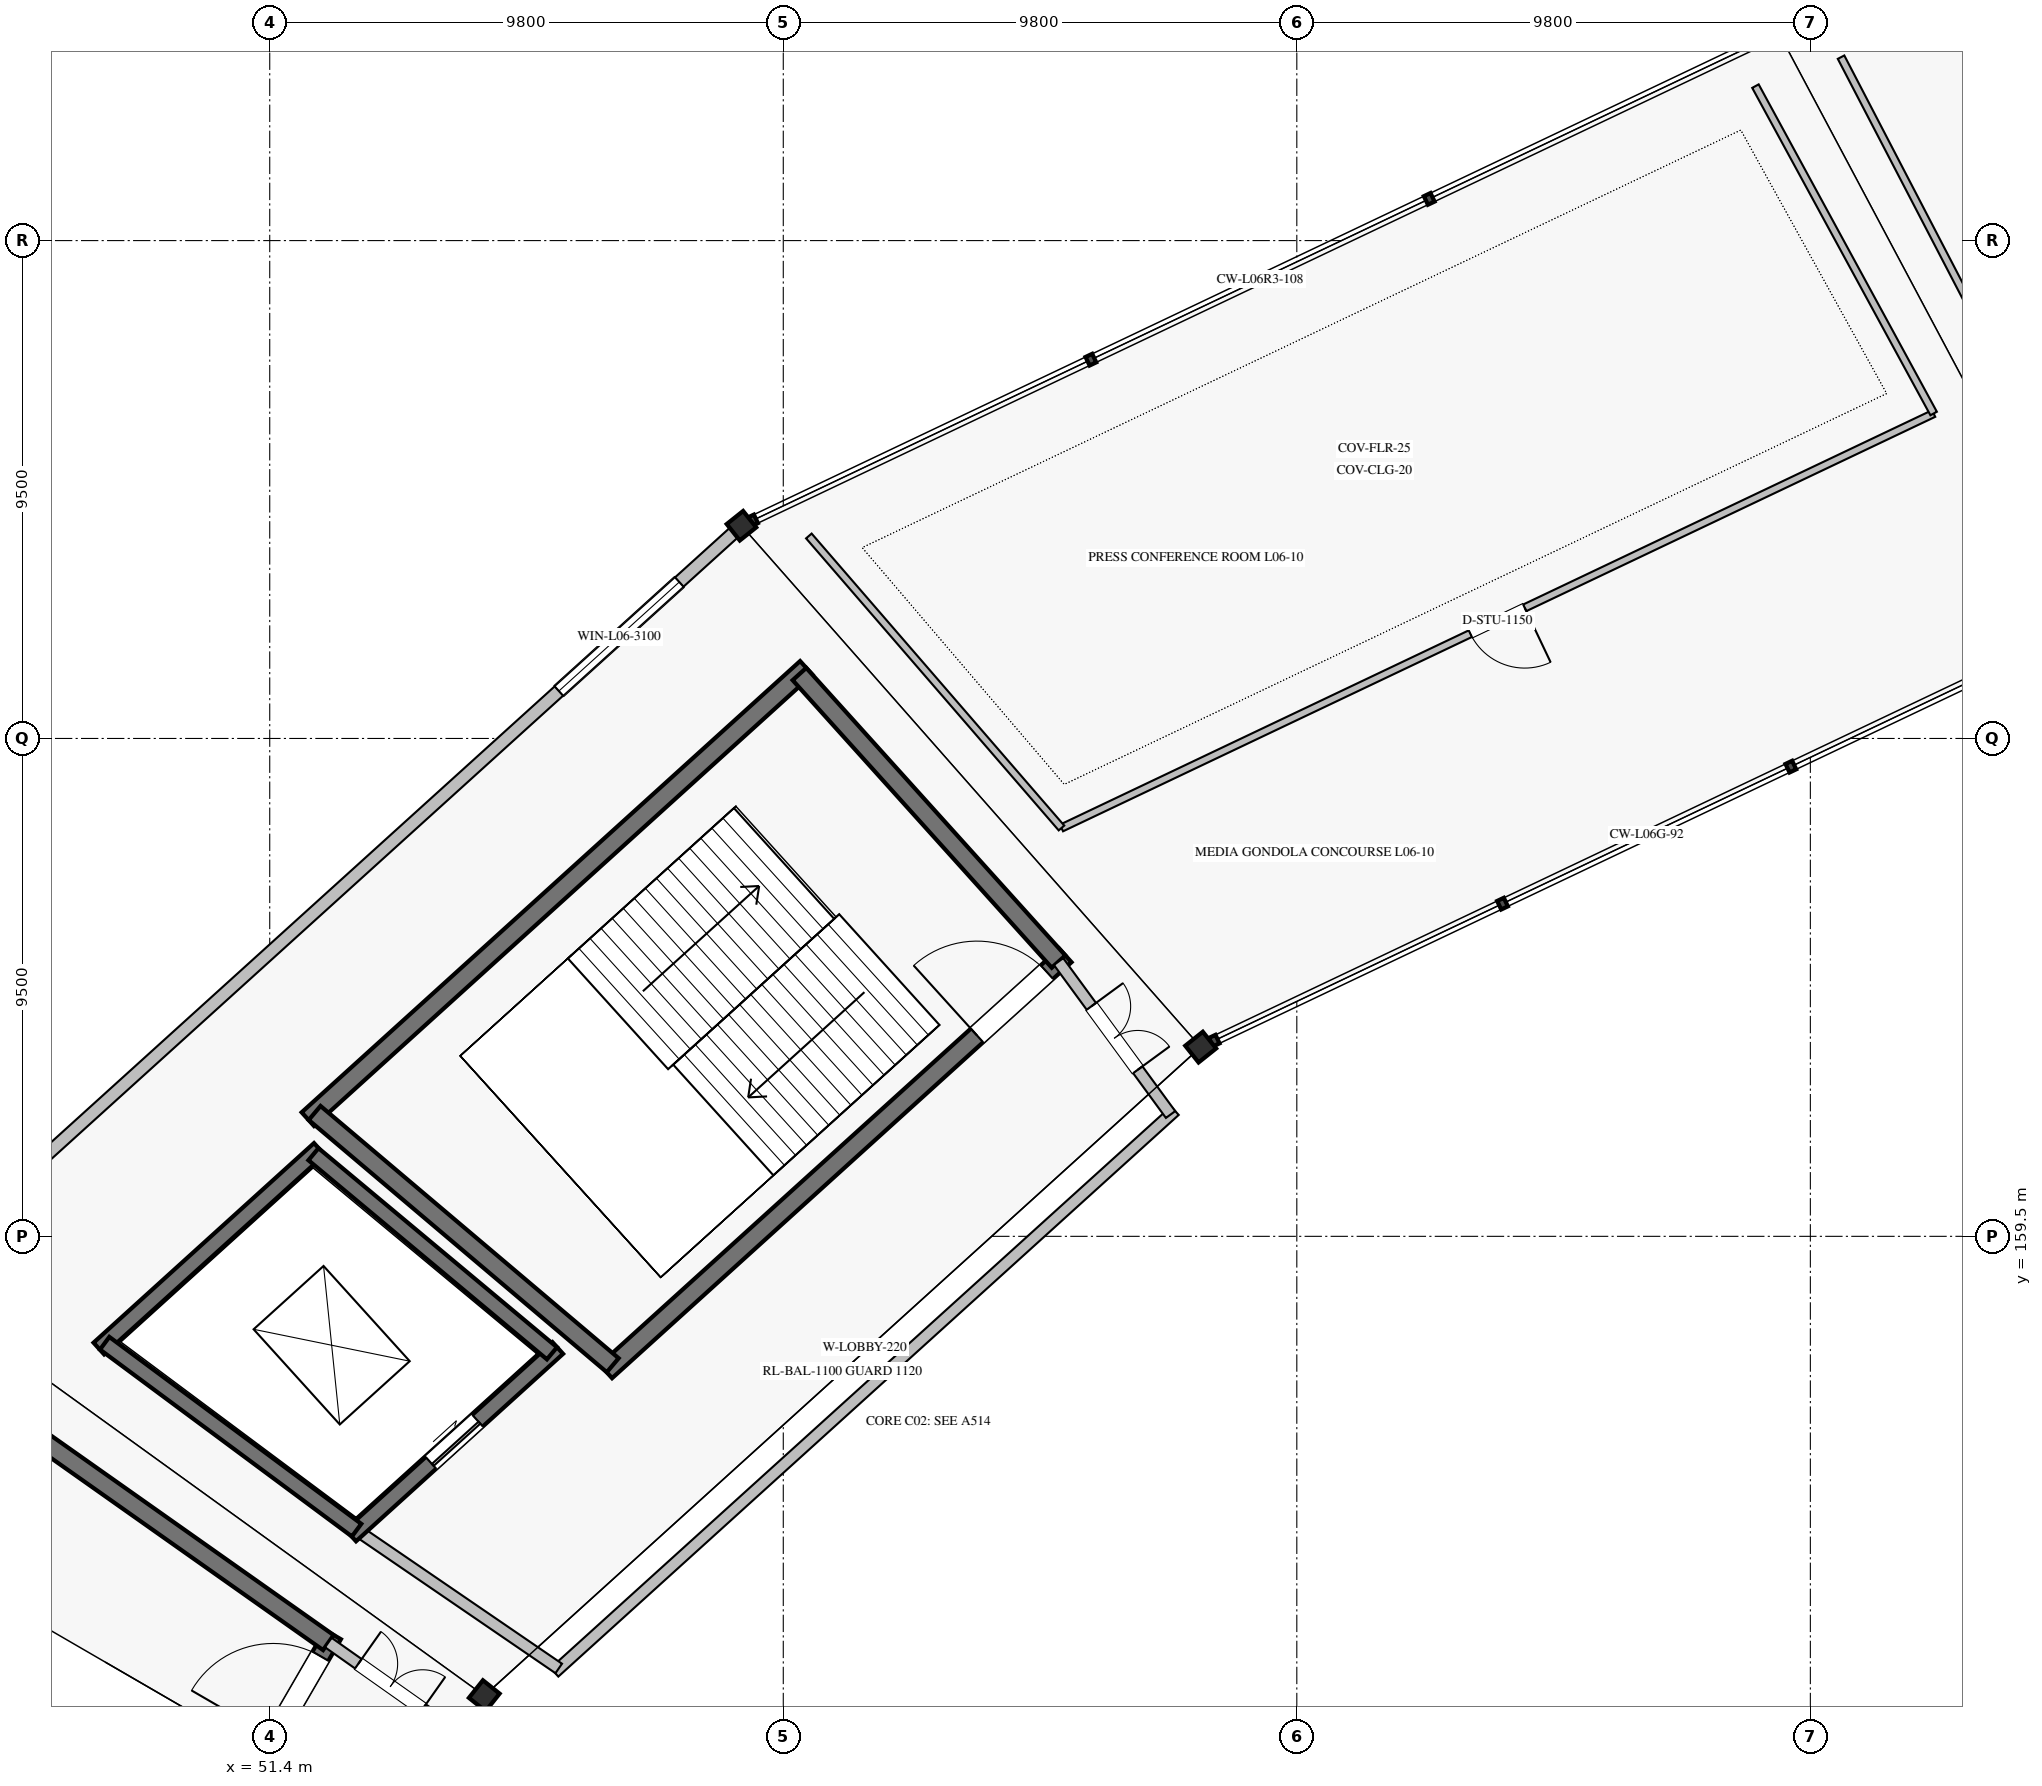
"""IFC4 building model, lengths in metres.
Left out: names, types, materials, properties, quantities, classifications, styles, units other than length and angle.
Written with IfcOpenShell. Run it as: python <this file> out.ifc"""

import sys

from ifc_helpers import new_model, si_unit, direction, frame, frame_2d, origin, origin_2d, place, context, subcontext, project, spatial, rectangle, hollow_rectangle, i_section, extrude, element, fill, save


model = new_model("IFC4")
c1 = context("Model", 3, precision=1e-05, world=origin(), true_north=direction((0.0, 1.0)))
c2 = subcontext(c1, "Body", "Model", "MODEL_VIEW")
j1 = project(units=[si_unit("LENGTHUNIT", "METRE"), si_unit("PLANEANGLEUNIT", "RADIAN")], contexts=[c1])
p1 = place(None, origin())
s1 = spatial("IfcSite", under=j1, at=p1, CompositionType="ELEMENT")
p2 = place(p1, origin())
s2 = spatial("IfcBuilding", under=s1, at=p2, CompositionType="ELEMENT")
p3 = place(p2, frame((0.0, 0.0, 31.28)))
s3 = spatial("IfcBuildingStorey", under=s2, at=p3, CompositionType="ELEMENT", Elevation=31.28)
for number, where, z_axis, x_axis in (
    (1, (69.166, 163.111, 0.0), (0.0, 0.0, 1.0), (-0.623, 0.782, 0.0)),
    (2, (55.494, 150.734, 0.0), (0.0, 0.0, 1.0), (-0.782, 0.623, 0.0)),
):
    element("IfcColumn", number, at=place(p3, frame(where, z_axis=z_axis, x_axis=x_axis)), inside=s3, PredefinedType="COLUMN", context=c2, shape_type="SweptSolid", body=[
        extrude(i_section(OverallWidth=0.407, OverallDepth=0.428, WebThickness=0.02, FlangeThickness=0.035, FilletRadius=0.013, at=origin_2d()), origin(), (0.0, 0.0, 1.0), 5.44),
    ])
p4 = place(p3, frame((60.402, 173.059, 0.0), z_axis=(0.0, 0.0, 1.0), x_axis=(-0.623489801853, 0.781831482473, 0.0)))
e3 = element("IfcColumn", 3, at=p4, inside=s3, PredefinedType="COLUMN", context=c2, shape_type="SweptSolid", body=[
    extrude(hollow_rectangle(XDim=0.4, YDim=0.4, WallThickness=0.019, at=origin_2d()), origin(), (0.0, 0.0, 1.0), 5.44),
])
p5 = place(p3, frame((60.254, 172.925, 0.0), z_axis=(0.0, 0.0, 1.0), x_axis=(-0.74134637924, -0.671122601309, 0.0)))
e4 = element("IfcWall", 4, at=p5, inside=s3, PredefinedType="SOLIDWALL", context=c2, shape_type="SweptSolid", body=[
    extrude(rectangle(XDim=21.044, YDim=0.24, at=frame_2d((10.522, 0.0))), origin(), (0.0, 0.0, 1.0), 4.358),
])
p6 = place(p5, frame((1.4, 0.0, 1.0)))
e5 = element("IfcOpeningElement", 5, at=p6, cuts=e4, PredefinedType="OPENING", context=c2, shape_type="SweptSolid", body=[
    extrude(rectangle(XDim=3.1, YDim=2.15, at=frame_2d((1.55, 1.075))), frame((0.0, 0.13, 0.0), z_axis=(0.0, -1.0, 0.0), x_axis=(1.0, 0.0, 0.0)), (0.0, 0.0, 1.0), 0.26),
])
p7 = place(p3, frame((66.583, 164.86, 0.0), z_axis=(0.0, 0.0, 1.0), x_axis=(-0.741348929385, -0.671119784315, 0.0)))
e6 = element("IfcWall", 6, at=p7, inside=s3, PredefinedType="SHEAR", context=c2, shape_type="SweptSolid", body=[
    extrude(rectangle(XDim=11.826, YDim=0.35, at=frame_2d((5.913, 0.0))), origin(), (0.0, 0.0, 1.0), 5.16),
])
p8 = place(p7, frame((0.475, 0.0, 0.0)))
e7 = element("IfcOpeningElement", 7, at=p8, cuts=e6, PredefinedType="OPENING", context=c2, shape_type="SweptSolid", body=[
    extrude(rectangle(XDim=1.8, YDim=2.2, at=frame_2d((0.9, 1.1))), frame((0.0, 0.185, 0.0), z_axis=(0.0, -1.0, 0.0), x_axis=(1.0, 0.0, 0.0)), (0.0, 0.0, 1.0), 0.37),
])
p9 = place(p3, frame((61.639, 170.347, 0.0), z_axis=(0.0, 0.0, 1.0), x_axis=(-0.741351373721, -0.671117084183, 0.0)))
e8 = element("IfcWall", 8, at=p9, inside=s3, PredefinedType="SHEAR", context=c2, shape_type="SweptSolid", body=[
    extrude(rectangle(XDim=12.83, YDim=0.35, at=frame_2d((6.415, 0.0))), origin(), (0.0, 0.0, 1.0), 5.16),
])
p10 = place(p3, frame((66.454, 164.743, 0.0), z_axis=(0.0, 0.0, 1.0), x_axis=(-0.669463145673, 0.742845270958, 0.0)))
e9 = element("IfcWall", 9, at=p10, inside=s3, PredefinedType="SHEAR", context=c2, shape_type="SweptSolid", body=[
    extrude(rectangle(XDim=7.386, YDim=0.35, at=frame_2d((3.693, 0.0))), origin(), (0.0, 0.0, 1.0), 5.16),
])
p11 = place(p3, frame((57.945, 157.041, 0.0), z_axis=(0.0, 0.0, 1.0), x_axis=(-0.763422324031, 0.64589964791, 0.0)))
e10 = element("IfcWall", 10, at=p11, inside=s3, PredefinedType="SHEAR", context=c2, shape_type="SweptSolid", body=[
    extrude(rectangle(XDim=7.452, YDim=0.35, at=frame_2d((3.726, 0.0))), origin(), (0.0, 0.0, 1.0), 5.16),
])
p12 = place(p3, frame((56.897, 157.369, 0.0), z_axis=(0.0, 0.0, 1.0), x_axis=(-0.741350155641, -0.671118429736, 0.0)))
e11 = element("IfcWall", 11, at=p12, inside=s3, PredefinedType="SHEAR", context=c2, shape_type="SweptSolid", body=[
    extrude(rectangle(XDim=5.329, YDim=0.3, at=frame_2d((2.665, 0.0))), origin(), (0.0, 0.0, 1.0), 5.16),
])
p13 = place(p12, frame((2.065, 0.0, 0.0)))
e12 = element("IfcOpeningElement", 12, at=p13, cuts=e11, PredefinedType="OPENING", context=c2, shape_type="SweptSolid", body=[
    extrude(rectangle(XDim=1.2, YDim=2.2, at=frame_2d((0.6, 1.1))), frame((0.0, 0.16, 0.0), z_axis=(0.0, -1.0, 0.0), x_axis=(1.0, 0.0, 0.0)), (0.0, 0.0, 1.0), 0.32),
])
p14 = place(p3, frame((52.346, 161.168, 0.0), z_axis=(0.0, 0.0, 1.0), x_axis=(-0.74134208775, -0.671127341815, 0.0)))
e13 = element("IfcWall", 13, at=p14, inside=s3, PredefinedType="SHEAR", context=c2, shape_type="SweptSolid", body=[
    extrude(rectangle(XDim=5.675, YDim=0.3, at=frame_2d((2.837, 0.0))), origin(), (0.0, 0.0, 1.0), 5.16),
])
p15 = place(p3, frame((56.786, 157.268, 0.0), z_axis=(0.0, 0.0, 1.0), x_axis=(-0.767711354146, 0.640795815151, 0.0)))
e14 = element("IfcWall", 14, at=p15, inside=s3, PredefinedType="SHEAR", context=c2, shape_type="SweptSolid", body=[
    extrude(rectangle(XDim=5.929, YDim=0.3, at=frame_2d((2.964, 0.0))), origin(), (0.0, 0.0, 1.0), 5.16),
])
p16 = place(p3, frame((53.058, 153.893, 0.0), z_axis=(0.0, 0.0, 1.0), x_axis=(-0.803101805449, 0.59584183311, 0.0)))
e15 = element("IfcWall", 15, at=p16, inside=s3, PredefinedType="SHEAR", context=c2, shape_type="SweptSolid", body=[
    extrude(rectangle(XDim=5.986, YDim=0.3, at=frame_2d((2.993, 0.0))), origin(), (0.0, 0.0, 1.0), 5.16),
])
p17 = place(p3, frame((68.673, 161.898, 0.0), z_axis=(0.0, 0.0, 1.0), x_axis=(-0.741351035574, -0.671117457717, 0.0)))
e16 = element("IfcWall", 16, at=p17, inside=s3, PredefinedType="SOLIDWALL", context=c2, shape_type="SweptSolid", body=[
    extrude(rectangle(XDim=15.969, YDim=0.22, at=frame_2d((7.985, 0.0))), origin(), (0.0, 0.0, 1.0), 5.16),
])
p18 = place(p3, frame((68.591, 161.824, 0.0), z_axis=(0.0, 0.0, 1.0), x_axis=(-0.590836915359, 0.806791013491, 0.0)))
e17 = element("IfcWall", 17, at=p18, inside=s3, PredefinedType="SOLIDWALL", context=c2, shape_type="SweptSolid", body=[
    extrude(rectangle(XDim=3.618, YDim=0.22, at=frame_2d((1.809, 0.0))), origin(), (0.0, 0.0, 1.0), 5.16),
])
p19 = place(p18, frame((1.059, 0.0, 0.0)))
e18 = element("IfcOpeningElement", 18, at=p19, cuts=e17, PredefinedType="OPENING", context=c2, shape_type="SweptSolid", body=[
    extrude(rectangle(XDim=1.5, YDim=2.2, at=frame_2d((0.75, 1.1))), frame((0.0, 0.12, 0.0), z_axis=(0.0, -1.0, 0.0), x_axis=(1.0, 0.0, 0.0)), (0.0, 0.0, 1.0), 0.24),
])
p20 = place(p3, frame((56.915, 151.254, 0.0), z_axis=(0.0, 0.0, 1.0), x_axis=(-0.825385410642, 0.564569680287, 0.0)))
e19 = element("IfcWall", 19, at=p20, inside=s3, PredefinedType="SOLIDWALL", context=c2, shape_type="SweptSolid", body=[
    extrude(rectangle(XDim=4.674, YDim=0.22, at=frame_2d((2.337, 0.0))), origin(), (0.0, 0.0, 1.0), 5.16),
])
p21 = place(p3, frame((52.606, 151.9, 0.0), z_axis=(0.0, 0.0, 1.0), x_axis=(-0.501587404838, -0.865106973332, 0.0)))
e20 = element("IfcWall", 20, at=p21, inside=s3, PredefinedType="SHEAR", context=c2, shape_type="SweptSolid", body=[
    extrude(rectangle(XDim=11.435, YDim=0.35, at=frame_2d((5.718, 0.0))), origin(), (0.0, 0.0, 1.0), 5.16),
])
p22 = place(p21, frame((0.475, 0.0, 0.0)))
e21 = element("IfcOpeningElement", 21, at=p22, cuts=e20, PredefinedType="OPENING", context=c2, shape_type="SweptSolid", body=[
    extrude(rectangle(XDim=1.8, YDim=2.2, at=frame_2d((0.9, 1.1))), frame((0.0, 0.185, 0.0), z_axis=(0.0, -1.0, 0.0), x_axis=(1.0, 0.0, 0.0)), (0.0, 0.0, 1.0), 0.37),
])
p23 = place(p3, frame((52.519, 151.748, 0.0), z_axis=(0.0, 0.0, 1.0), x_axis=(-0.816983109824, 0.576661597701, 0.0)))
e22 = element("IfcWall", 22, at=p23, inside=s3, PredefinedType="SHEAR", context=c2, shape_type="SweptSolid", body=[
    extrude(rectangle(XDim=7.544, YDim=0.35, at=frame_2d((3.772, 0.0))), origin(), (0.0, 0.0, 1.0), 5.16),
])
p24 = place(p3, frame((54.889, 150.075, 0.0), z_axis=(0.0, 0.0, 1.0), x_axis=(-0.816984187086, 0.57666007149, 0.0)))
e23 = element("IfcWall", 23, at=p24, inside=s3, PredefinedType="SOLIDWALL", context=c2, shape_type="SweptSolid", body=[
    extrude(rectangle(XDim=2.901, YDim=0.22, at=frame_2d((1.451, 0.0))), origin(), (0.0, 0.0, 1.0), 5.16),
])
p25 = place(p24, frame((0.701, 0.0, 0.0)))
e24 = element("IfcOpeningElement", 24, at=p25, cuts=e23, PredefinedType="OPENING", context=c2, shape_type="SweptSolid", body=[
    extrude(rectangle(XDim=1.5, YDim=2.2, at=frame_2d((0.75, 1.1))), frame((0.0, 0.12, 0.0), z_axis=(0.0, -1.0, 0.0), x_axis=(1.0, 0.0, 0.0)), (0.0, 0.0, 1.0), 0.24),
])
p26 = place(p3, frame((84.658, 175.71, 0.0), z_axis=(0.0, 0.0, 1.0), x_axis=(-0.461466568794, 0.887157599238, 0.0)))
e25 = element("IfcWall", 25, at=p26, inside=s3, PredefinedType="PARTITIONING", context=c2, shape_type="SweptSolid", body=[
    extrude(rectangle(XDim=7.09, YDim=0.14, at=frame_2d((3.545, 0.0))), origin(), (0.0, 0.0, 1.0), 4.48),
])
p27 = place(p3, frame((83.153, 175.2, 0.0), z_axis=(0.0, 0.0, 1.0), x_axis=(-0.90321677741, -0.429184637429, 0.0)))
e26 = element("IfcWall", 26, at=p27, inside=s3, PredefinedType="PARTITIONING", context=c2, shape_type="SweptSolid", body=[
    extrude(rectangle(XDim=18.427, YDim=0.14, at=frame_2d((9.214, 0.0))), origin(), (0.0, 0.0, 1.0), 4.48),
])
p28 = place(p27, frame((8.639, 0.0, 0.0)))
e27 = element("IfcOpeningElement", 27, at=p28, cuts=e26, PredefinedType="OPENING", context=c2, shape_type="SweptSolid", body=[
    extrude(rectangle(XDim=1.15, YDim=2.25, at=frame_2d((0.575, 1.125))), frame((0.0, 0.08, 0.0), z_axis=(0.0, -1.0, 0.0), x_axis=(1.0, 0.0, 0.0)), (0.0, 0.0, 1.0), 0.16),
])
p29 = place(p3, frame((83.153, 175.2, 0.0), z_axis=(0.0, 0.0, 1.0), x_axis=(-0.47812325427, 0.878292749444, 0.0)))
e28 = element("IfcWall", 28, at=p29, inside=s3, PredefinedType="PARTITIONING", context=c2, shape_type="SweptSolid", body=[
    extrude(rectangle(XDim=7.113, YDim=0.14, at=frame_2d((3.556, 0.0))), origin(), (0.0, 0.0, 1.0), 4.48),
])
p30 = place(p3, frame((66.509, 167.292, 0.0), z_axis=(0.0, 0.0, 1.0), x_axis=(-0.654288201841, 0.7562452968, 0.0)))
e29 = element("IfcWall", 29, at=p30, inside=s3, PredefinedType="PARTITIONING", context=c2, shape_type="SweptSolid", body=[
    extrude(rectangle(XDim=7.368, YDim=0.14, at=frame_2d((3.684, 0.0))), origin(), (0.0, 0.0, 1.0), 4.48),
])
p31 = place(p6, origin())
e30 = element("IfcWindow", 30, at=p31, inside=s3, PartitioningType="SINGLE_PANEL", PredefinedType="WINDOW", context=c2, shape_type="SweptSolid", body=[
    extrude(rectangle(XDim=3.1, YDim=2.15, at=frame_2d((1.55, 1.075))), frame((0.0, 0.03, 0.0), z_axis=(0.0, -1.0, 0.0), x_axis=(1.0, 0.0, 0.0)), (0.0, 0.0, 1.0), 0.06),
])
fill(e5, e30)
p32 = place(p8, frame((1.8, 0.0, 0.0), z_axis=(0.0, 0.0, 1.0), x_axis=(-1.0, 0.0, 0.0)))
e31 = element("IfcDoor", 31, at=p32, inside=s3, OperationType="SINGLE_SWING_LEFT", PredefinedType="DOOR", context=c2, shape_type="SweptSolid", body=[
    extrude(rectangle(XDim=1.8, YDim=2.2, at=frame_2d((0.9, 1.1))), frame((0.0, 0.025, 0.0), z_axis=(0.0, -1.0, 0.0), x_axis=(1.0, 0.0, 0.0)), (0.0, 0.0, 1.0), 0.05),
])
fill(e7, e31)
p33 = place(p13, origin())
e32 = element("IfcDoor", 32, at=p33, inside=s3, OperationType="SLIDING_TO_LEFT", PredefinedType="DOOR", context=c2, shape_type="SweptSolid", body=[
    extrude(rectangle(XDim=1.2, YDim=2.2, at=frame_2d((0.6, 1.1))), frame((0.0, 0.025, 0.0), z_axis=(0.0, -1.0, 0.0), x_axis=(1.0, 0.0, 0.0)), (0.0, 0.0, 1.0), 0.05),
])
fill(e12, e32)
p34 = place(p19, frame((1.5, 0.0, 0.0), z_axis=(0.0, 0.0, 1.0), x_axis=(-1.0, 0.0, 0.0)))
e33 = element("IfcDoor", 33, at=p34, inside=s3, OperationType="DOUBLE_DOOR_SINGLE_SWING", PredefinedType="DOOR", context=c2, shape_type="SweptSolid", body=[
    extrude(rectangle(XDim=1.5, YDim=2.2, at=frame_2d((0.75, 1.1))), frame((0.0, 0.025, 0.0), z_axis=(0.0, -1.0, 0.0), x_axis=(1.0, 0.0, 0.0)), (0.0, 0.0, 1.0), 0.05),
])
fill(e18, e33)
p35 = place(p22, frame((1.8, 0.0, 0.0), z_axis=(0.0, 0.0, 1.0), x_axis=(-1.0, 0.0, 0.0)))
e34 = element("IfcDoor", 34, at=p35, inside=s3, OperationType="SINGLE_SWING_LEFT", PredefinedType="DOOR", context=c2, shape_type="SweptSolid", body=[
    extrude(rectangle(XDim=1.8, YDim=2.2, at=frame_2d((0.9, 1.1))), frame((0.0, 0.025, 0.0), z_axis=(0.0, -1.0, 0.0), x_axis=(1.0, 0.0, 0.0)), (0.0, 0.0, 1.0), 0.05),
])
fill(e21, e34)
p36 = place(p25, frame((1.5, 0.0, 0.0), z_axis=(0.0, 0.0, 1.0), x_axis=(-1.0, 0.0, 0.0)))
e35 = element("IfcDoor", 35, at=p36, inside=s3, OperationType="DOUBLE_DOOR_SINGLE_SWING", PredefinedType="DOOR", context=c2, shape_type="SweptSolid", body=[
    extrude(rectangle(XDim=1.5, YDim=2.2, at=frame_2d((0.75, 1.1))), frame((0.0, 0.025, 0.0), z_axis=(0.0, -1.0, 0.0), x_axis=(1.0, 0.0, 0.0)), (0.0, 0.0, 1.0), 0.05),
])
fill(e24, e35)
p37 = place(p28, origin())
e36 = element("IfcDoor", 36, at=p37, inside=s3, OperationType="SINGLE_SWING_LEFT", PredefinedType="DOOR", context=c2, shape_type="SweptSolid", body=[
    extrude(rectangle(XDim=1.15, YDim=2.25, at=frame_2d((0.575, 1.125))), frame((0.0, 0.025, 0.0), z_axis=(0.0, -1.0, 0.0), x_axis=(1.0, 0.0, 0.0)), (0.0, 0.0, 1.0), 0.05),
])
fill(e27, e36)
save(model, sys.argv[1])
